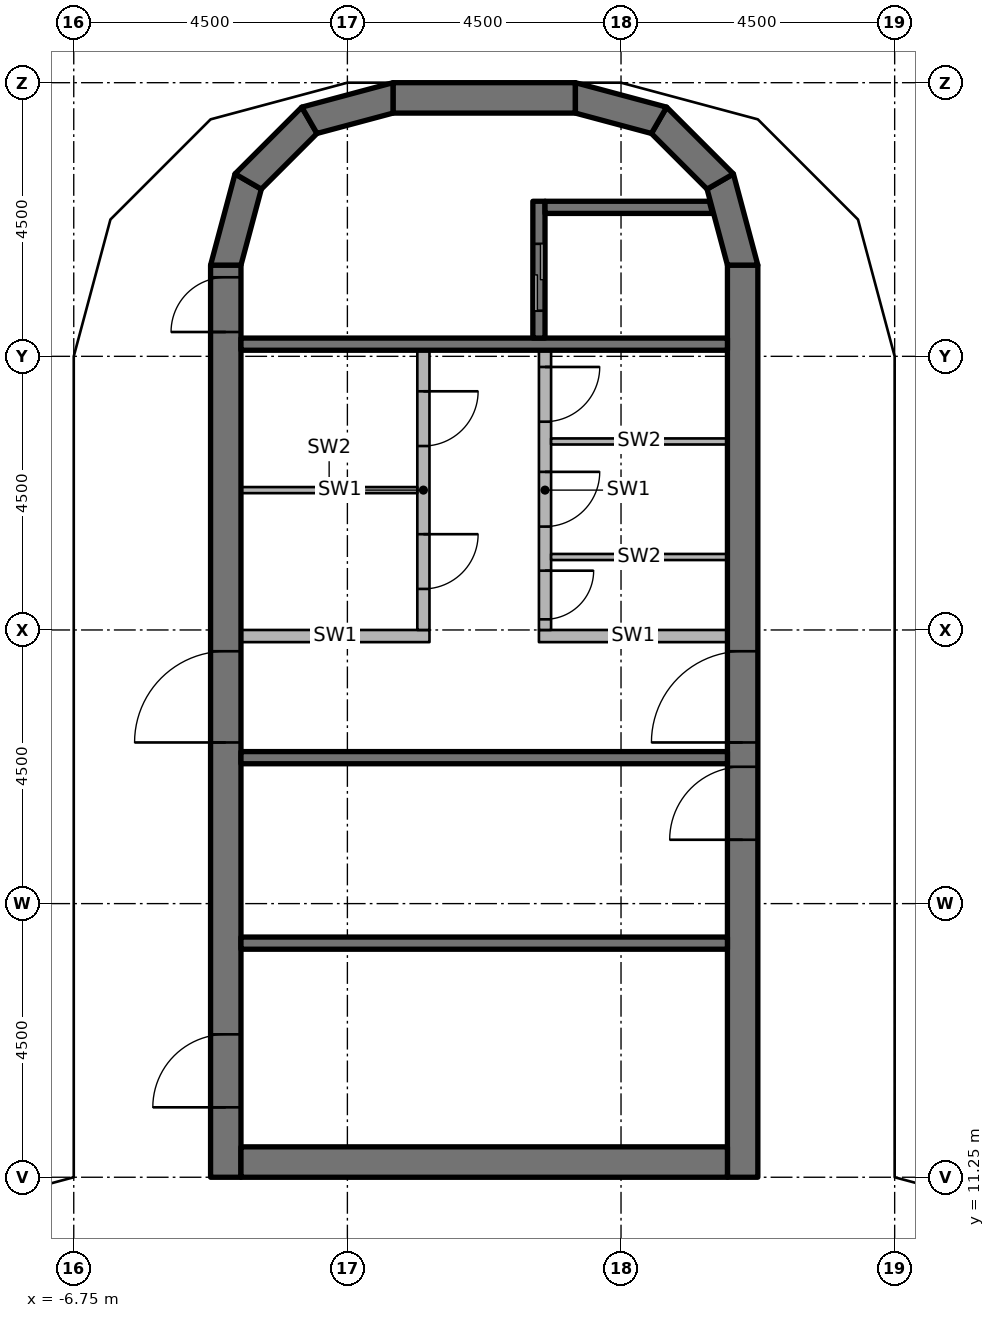
"""IFC4 building model, lengths in metres.
Left out: names, types, materials, properties, quantities, classifications, styles, units other than length and angle.
Written with IfcOpenShell. Run it as: python <this file> out.ifc"""

import sys

from ifc_helpers import new_model, si_unit, direction, frame, frame_2d, origin, origin_2d, place, context, subcontext, project, spatial, polyline, rectangle, outline, extrude, element, fill, save


model = new_model("IFC4")
c1 = context("Model", 3, precision=1e-05, world=origin(), true_north=direction((0.0, 1.0)))
c2 = subcontext(c1, "Body", "Model", "MODEL_VIEW")
j1 = project(units=[si_unit("LENGTHUNIT", "METRE"), si_unit("PLANEANGLEUNIT", "RADIAN")], contexts=[c1])
p1 = place(None, origin())
s1 = spatial("IfcSite", under=j1, at=p1, CompositionType="ELEMENT")
p2 = place(p1, origin())
s2 = spatial("IfcBuilding", under=s1, at=p2, CompositionType="ELEMENT")
p3 = place(p2, frame((0.0, 0.0, 284.0)))
s3 = spatial("IfcBuildingStorey", under=s2, at=p3, CompositionType="ELEMENT", Elevation=284.0)
for number, where, z_axis, x_axis in (
    (1, (-6.25, 10.75, 0.0), (0.0, 0.0, 1.0), (1.0, 0.0, 0.0)),
    (2, (-6.25, 15.75, 0.0), (0.0, 0.0, 1.0), (1.0, 0.0, 0.0)),
    (3, (-6.25, 20.25, 0.0), (0.0, 0.0, 1.0), (1.0, 0.0, 0.0)),
    (4, (-6.25, 24.65, 0.0), (0.0, 0.0, 1.0), (1.0, 0.0, 0.0)),
    (5, (6.25, 10.75, 0.0), (0.0, 0.0, 1.0), (1.0, 0.0, 0.0)),
    (6, (6.25, 15.75, 0.0), (0.0, 0.0, 1.0), (1.0, 0.0, 0.0)),
    (7, (6.25, 20.25, 0.0), (0.0, 0.0, 1.0), (1.0, 0.0, 0.0)),
    (8, (6.25, 24.65, 0.0), (0.0, 0.0, 1.0), (1.0, 0.0, 0.0)),
):
    element("IfcColumn", number, at=place(p3, frame(where, z_axis=z_axis, x_axis=x_axis)), inside=s3, PredefinedType="COLUMN", context=c2, shape_type="SweptSolid", body=[
        extrude(rectangle(XDim=0.6, YDim=0.6, at=origin_2d()), origin(), (0.0, 0.0, 1.0), 7.45),
    ])
p4 = place(p3, frame((-4.25, 11.25, 0.0), z_axis=(0.0, 0.0, 1.0), x_axis=(0.0, 1.0, 0.0)))
e9 = element("IfcWall", 9, at=p4, inside=s3, PredefinedType="SHEAR", context=c2, shape_type="SweptSolid", body=[
    extrude(rectangle(XDim=15.0, YDim=0.5, at=frame_2d((7.5, 0.0))), origin(), (0.0, 0.0, 1.0), 7.6),
])
p5 = place(p4, frame((7.15, 0.0, 0.0)))
e10 = element("IfcOpeningElement", 10, at=p5, cuts=e9, PredefinedType="OPENING", context=c2, shape_type="SweptSolid", body=[
    extrude(rectangle(XDim=1.5, YDim=2.3, at=frame_2d((0.75, 1.15))), frame((0.0, 0.26, 0.0), z_axis=(0.0, -1.0, 0.0), x_axis=(1.0, 0.0, 0.0)), (0.0, 0.0, 1.0), 0.52),
])
p6 = place(p4, frame((13.9, 0.0, 0.0)))
e11 = element("IfcOpeningElement", 11, at=p6, cuts=e9, PredefinedType="OPENING", context=c2, shape_type="SweptSolid", body=[
    extrude(rectangle(XDim=0.9, YDim=2.1, at=frame_2d((0.45, 1.05))), frame((0.0, 0.26, 0.0), z_axis=(0.0, -1.0, 0.0), x_axis=(1.0, 0.0, 0.0)), (0.0, 0.0, 1.0), 0.52),
])
p7 = place(p4, frame((1.15, 0.0, 0.0)))
e12 = element("IfcOpeningElement", 12, at=p7, cuts=e9, PredefinedType="OPENING", context=c2, shape_type="SweptSolid", body=[
    extrude(rectangle(XDim=1.2, YDim=2.1, at=frame_2d((0.6, 1.05))), frame((0.0, 0.26, 0.0), z_axis=(0.0, -1.0, 0.0), x_axis=(1.0, 0.0, 0.0)), (0.0, 0.0, 1.0), 0.52),
])
p8 = place(p3, frame((4.25, 11.25, 0.0), z_axis=(0.0, 0.0, 1.0), x_axis=(0.0, 1.0, 0.0)))
e13 = element("IfcWall", 13, at=p8, inside=s3, PredefinedType="SHEAR", context=c2, shape_type="SweptSolid", body=[
    extrude(rectangle(XDim=15.0, YDim=0.5, at=frame_2d((7.5, 0.0))), origin(), (0.0, 0.0, 1.0), 7.6),
])
p9 = place(p8, frame((7.15, 0.0, 0.0)))
e14 = element("IfcOpeningElement", 14, at=p9, cuts=e13, PredefinedType="OPENING", context=c2, shape_type="SweptSolid", body=[
    extrude(rectangle(XDim=1.5, YDim=2.3, at=frame_2d((0.75, 1.15))), frame((0.0, 0.26, 0.0), z_axis=(0.0, -1.0, 0.0), x_axis=(1.0, 0.0, 0.0)), (0.0, 0.0, 1.0), 0.52),
])
p10 = place(p8, frame((5.55, 0.0, 0.0)))
e15 = element("IfcOpeningElement", 15, at=p10, cuts=e13, PredefinedType="OPENING", context=c2, shape_type="SweptSolid", body=[
    extrude(rectangle(XDim=1.2, YDim=2.1, at=frame_2d((0.6, 1.05))), frame((0.0, 0.26, 0.0), z_axis=(0.0, -1.0, 0.0), x_axis=(1.0, 0.0, 0.0)), (0.0, 0.0, 1.0), 0.52),
])
p11 = place(p3, frame((-4.0, 11.5, 0.0), z_axis=(0.0, 0.0, 1.0), x_axis=(1.0, 0.0, 0.0)))
e16 = element("IfcWall", 16, at=p11, inside=s3, PredefinedType="SHEAR", context=c2, shape_type="SweptSolid", body=[
    extrude(rectangle(XDim=8.0, YDim=0.5, at=frame_2d((4.0, 0.0))), origin(), (0.0, 0.0, 1.0), 7.6),
])
p12 = place(p3, frame((-1.5, 29.0, 0.0), z_axis=(0.0, 0.0, 1.0), x_axis=(1.0, 0.0, 0.0)))
e17 = element("IfcWall", 17, at=p12, inside=s3, PredefinedType="SHEAR", context=c2, shape_type="SweptSolid", body=[
    extrude(rectangle(XDim=3.0, YDim=0.5, at=frame_2d((1.5, 0.0))), origin(), (0.0, 0.0, 1.0), 7.6),
])
p13 = place(p3, origin())
e18 = element("IfcWall", 18, at=p13, inside=s3, PredefinedType="SHEAR", context=c2, shape_type="SweptSolid", body=[
    extrude(outline(polyline([(-4.5, 26.25), (-4.098, 27.75), (-3.665, 27.5), (-4.0, 26.25), (-4.5, 26.25)])), origin(), (0.0, 0.0, 1.0), 7.6),
])
p14 = place(p3, origin())
e19 = element("IfcWall", 19, at=p14, inside=s3, PredefinedType="SHEAR", context=c2, shape_type="SweptSolid", body=[
    extrude(outline(polyline([(-4.098, 27.75), (-3.0, 28.848), (-2.75, 28.415), (-3.665, 27.5), (-4.098, 27.75)])), origin(), (0.0, 0.0, 1.0), 7.6),
])
p15 = place(p3, origin())
e20 = element("IfcWall", 20, at=p15, inside=s3, PredefinedType="SHEAR", context=c2, shape_type="SweptSolid", body=[
    extrude(outline(polyline([(-3.0, 28.848), (-1.5, 29.25), (-1.5, 28.75), (-2.75, 28.415), (-3.0, 28.848)])), origin(), (0.0, 0.0, 1.0), 7.6),
])
p16 = place(p3, origin())
e21 = element("IfcWall", 21, at=p16, inside=s3, PredefinedType="SHEAR", context=c2, shape_type="SweptSolid", body=[
    extrude(outline(polyline([(4.5, 26.25), (4.098, 27.75), (3.665, 27.5), (4.0, 26.25), (4.5, 26.25)])), origin(), (0.0, 0.0, 1.0), 7.6),
])
p17 = place(p3, origin())
e22 = element("IfcWall", 22, at=p17, inside=s3, PredefinedType="SHEAR", context=c2, shape_type="SweptSolid", body=[
    extrude(outline(polyline([(4.098, 27.75), (3.0, 28.848), (2.75, 28.415), (3.665, 27.5), (4.098, 27.75)])), origin(), (0.0, 0.0, 1.0), 7.6),
])
p18 = place(p3, origin())
e23 = element("IfcWall", 23, at=p18, inside=s3, PredefinedType="SHEAR", context=c2, shape_type="SweptSolid", body=[
    extrude(outline(polyline([(3.0, 28.848), (1.5, 29.25), (1.5, 28.75), (2.75, 28.415), (3.0, 28.848)])), origin(), (0.0, 0.0, 1.0), 7.6),
])
p19 = place(p3, frame((-4.0, 24.95, 0.0), z_axis=(0.0, 0.0, 1.0), x_axis=(1.0, 0.0, 0.0)))
e24 = element("IfcWall", 24, at=p19, inside=s3, PredefinedType="SHEAR", context=c2, shape_type="SweptSolid", body=[
    extrude(rectangle(XDim=8.0, YDim=0.2, at=frame_2d((4.0, 0.0))), origin(), (0.0, 0.0, 1.0), 7.45),
])
p20 = place(p3, frame((0.9, 27.3, 0.0), z_axis=(0.0, 0.0, 1.0), x_axis=(0.0, -1.0, 0.0)))
e25 = element("IfcWall", 25, at=p20, inside=s3, PredefinedType="SHEAR", context=c2, shape_type="SweptSolid", body=[
    extrude(rectangle(XDim=2.25, YDim=0.2, at=frame_2d((1.125, 0.0))), origin(), (0.0, 0.0, 1.0), 7.45),
])
p21 = place(p20, frame((0.7, 0.0, 0.0)))
e26 = element("IfcOpeningElement", 26, at=p21, cuts=e25, PredefinedType="OPENING", context=c2, shape_type="SweptSolid", body=[
    extrude(rectangle(XDim=1.1, YDim=2.3, at=frame_2d((0.55, 1.15))), frame((0.0, 0.11, 0.0), z_axis=(0.0, -1.0, 0.0), x_axis=(1.0, 0.0, 0.0)), (0.0, 0.0, 1.0), 0.22),
])
p22 = place(p3, origin())
e27 = element("IfcWall", 27, at=p22, inside=s3, PredefinedType="SHEAR", context=c2, shape_type="SweptSolid", body=[
    extrude(outline(polyline([(1.0, 27.1), (3.755, 27.1), (3.701, 27.3), (1.0, 27.3), (1.0, 27.1)])), origin(), (0.0, 0.0, 1.0), 7.45),
])
for number, where, z_axis, x_axis in (
    (28, (-4.0, 18.15, 0.0), (0.0, 0.0, 1.0), (1.0, 0.0, 0.0)),
    (29, (-4.0, 15.1, 0.0), (0.0, 0.0, 1.0), (1.0, 0.0, 0.0)),
):
    element("IfcWall", number, at=place(p3, frame(where, z_axis=z_axis, x_axis=x_axis)), inside=s3, PredefinedType="SHEAR", context=c2, shape_type="SweptSolid", body=[
        extrude(rectangle(XDim=8.0, YDim=0.2, at=frame_2d((4.0, 0.0))), origin(), (0.0, 0.0, 1.0), 7.45),
    ])
p23 = place(p3, frame((-4.0, 20.15, 0.0), z_axis=(0.0, 0.0, 1.0), x_axis=(1.0, 0.0, 0.0)))
e30 = element("IfcWall", 30, at=p23, inside=s3, PredefinedType="PARTITIONING", context=c2, shape_type="SweptSolid", body=[
    extrude(rectangle(XDim=3.1, YDim=0.2, at=frame_2d((1.55, 0.0))), origin(), (0.0, 0.0, 1.0), 7.45),
])
p24 = place(p3, frame((-1.0, 24.85, 0.0), z_axis=(0.0, 0.0, 1.0), x_axis=(0.0, -1.0, 0.0)))
e31 = element("IfcWall", 31, at=p24, inside=s3, PredefinedType="PARTITIONING", context=c2, shape_type="SweptSolid", body=[
    extrude(rectangle(XDim=4.6, YDim=0.2, at=frame_2d((2.3, 0.0))), origin(), (0.0, 0.0, 1.0), 7.45),
])
p25 = place(p24, frame((0.675, 0.0, 0.0)))
e32 = element("IfcOpeningElement", 32, at=p25, cuts=e31, PredefinedType="OPENING", context=c2, shape_type="SweptSolid", body=[
    extrude(rectangle(XDim=0.9, YDim=2.1, at=frame_2d((0.45, 1.05))), frame((0.0, 0.11, 0.0), z_axis=(0.0, -1.0, 0.0), x_axis=(1.0, 0.0, 0.0)), (0.0, 0.0, 1.0), 0.22),
])
p26 = place(p24, frame((3.025, 0.0, 0.0)))
e33 = element("IfcOpeningElement", 33, at=p26, cuts=e31, PredefinedType="OPENING", context=c2, shape_type="SweptSolid", body=[
    extrude(rectangle(XDim=0.9, YDim=2.1, at=frame_2d((0.45, 1.05))), frame((0.0, 0.11, 0.0), z_axis=(0.0, -1.0, 0.0), x_axis=(1.0, 0.0, 0.0)), (0.0, 0.0, 1.0), 0.22),
])
p27 = place(p3, frame((0.9, 20.15, 0.0), z_axis=(0.0, 0.0, 1.0), x_axis=(1.0, 0.0, 0.0)))
e34 = element("IfcWall", 34, at=p27, inside=s3, PredefinedType="PARTITIONING", context=c2, shape_type="SweptSolid", body=[
    extrude(rectangle(XDim=3.1, YDim=0.2, at=frame_2d((1.55, 0.0))), origin(), (0.0, 0.0, 1.0), 7.45),
])
p28 = place(p3, frame((1.0, 24.85, 0.0), z_axis=(0.0, 0.0, 1.0), x_axis=(0.0, -1.0, 0.0)))
e35 = element("IfcWall", 35, at=p28, inside=s3, PredefinedType="PARTITIONING", context=c2, shape_type="SweptSolid", body=[
    extrude(rectangle(XDim=4.6, YDim=0.2, at=frame_2d((2.3, 0.0))), origin(), (0.0, 0.0, 1.0), 7.45),
])
p29 = place(p28, frame((0.275, 0.0, 0.0)))
e36 = element("IfcOpeningElement", 36, at=p29, cuts=e35, PredefinedType="OPENING", context=c2, shape_type="SweptSolid", body=[
    extrude(rectangle(XDim=0.9, YDim=2.1, at=frame_2d((0.45, 1.05))), frame((0.0, 0.11, 0.0), z_axis=(0.0, -1.0, 0.0), x_axis=(1.0, 0.0, 0.0)), (0.0, 0.0, 1.0), 0.22),
])
p30 = place(p28, frame((2.0, 0.0, 0.0)))
e37 = element("IfcOpeningElement", 37, at=p30, cuts=e35, PredefinedType="OPENING", context=c2, shape_type="SweptSolid", body=[
    extrude(rectangle(XDim=0.9, YDim=2.1, at=frame_2d((0.45, 1.05))), frame((0.0, 0.11, 0.0), z_axis=(0.0, -1.0, 0.0), x_axis=(1.0, 0.0, 0.0)), (0.0, 0.0, 1.0), 0.22),
])
p31 = place(p28, frame((3.625, 0.0, 0.0)))
e38 = element("IfcOpeningElement", 38, at=p31, cuts=e35, PredefinedType="OPENING", context=c2, shape_type="SweptSolid", body=[
    extrude(rectangle(XDim=0.8, YDim=2.1, at=frame_2d((0.4, 1.05))), frame((0.0, 0.11, 0.0), z_axis=(0.0, -1.0, 0.0), x_axis=(1.0, 0.0, 0.0)), (0.0, 0.0, 1.0), 0.22),
])
for number, where, z_axis, x_axis in (
    (39, (-4.0, 22.55, 0.0), (0.0, 0.0, 1.0), (1.0, 0.0, 0.0)),
    (40, (1.1, 23.35, 0.0), (0.0, 0.0, 1.0), (1.0, 0.0, 0.0)),
    (41, (1.1, 21.45, 0.0), (0.0, 0.0, 1.0), (1.0, 0.0, 0.0)),
):
    element("IfcWall", number, at=place(p3, frame(where, z_axis=z_axis, x_axis=x_axis)), inside=s3, PredefinedType="PARTITIONING", context=c2, shape_type="SweptSolid", body=[
        extrude(rectangle(XDim=2.9, YDim=0.1, at=frame_2d((1.45, 0.0))), origin(), (0.0, 0.0, 1.0), 7.45),
    ])
p32 = place(p5, origin())
e42 = element("IfcDoor", 42, at=p32, inside=s3, OperationType="DOUBLE_DOOR_SINGLE_SWING", PredefinedType="DOOR", context=c2, shape_type="SweptSolid", body=[
    extrude(rectangle(XDim=1.5, YDim=2.3, at=frame_2d((0.75, 1.15))), frame((0.0, 0.025, 0.0), z_axis=(0.0, -1.0, 0.0), x_axis=(1.0, 0.0, 0.0)), (0.0, 0.0, 1.0), 0.05),
])
fill(e10, e42)
p33 = place(p9, origin())
e43 = element("IfcDoor", 43, at=p33, inside=s3, OperationType="DOUBLE_DOOR_SINGLE_SWING", PredefinedType="DOOR", context=c2, shape_type="SweptSolid", body=[
    extrude(rectangle(XDim=1.5, YDim=2.3, at=frame_2d((0.75, 1.15))), frame((0.0, 0.025, 0.0), z_axis=(0.0, -1.0, 0.0), x_axis=(1.0, 0.0, 0.0)), (0.0, 0.0, 1.0), 0.05),
])
fill(e14, e43)
p34 = place(p6, origin())
e44 = element("IfcDoor", 44, at=p34, inside=s3, OperationType="SINGLE_SWING_RIGHT", PredefinedType="DOOR", context=c2, shape_type="SweptSolid", body=[
    extrude(rectangle(XDim=0.9, YDim=2.1, at=frame_2d((0.45, 1.05))), frame((0.0, 0.025, 0.0), z_axis=(0.0, -1.0, 0.0), x_axis=(1.0, 0.0, 0.0)), (0.0, 0.0, 1.0), 0.05),
])
fill(e11, e44)
p35 = place(p10, origin())
e45 = element("IfcDoor", 45, at=p35, inside=s3, OperationType="SINGLE_SWING_LEFT", PredefinedType="DOOR", context=c2, shape_type="SweptSolid", body=[
    extrude(rectangle(XDim=1.2, YDim=2.1, at=frame_2d((0.6, 1.05))), frame((0.0, 0.025, 0.0), z_axis=(0.0, -1.0, 0.0), x_axis=(1.0, 0.0, 0.0)), (0.0, 0.0, 1.0), 0.05),
])
fill(e15, e45)
p36 = place(p7, origin())
e46 = element("IfcDoor", 46, at=p36, inside=s3, OperationType="SINGLE_SWING_LEFT", PredefinedType="DOOR", context=c2, shape_type="SweptSolid", body=[
    extrude(rectangle(XDim=1.2, YDim=2.1, at=frame_2d((0.6, 1.05))), frame((0.0, 0.025, 0.0), z_axis=(0.0, -1.0, 0.0), x_axis=(1.0, 0.0, 0.0)), (0.0, 0.0, 1.0), 0.05),
])
fill(e12, e46)
p37 = place(p21, origin())
e47 = element("IfcDoor", 47, at=p37, inside=s3, OperationType="DOUBLE_DOOR_SLIDING", PredefinedType="DOOR", context=c2, shape_type="SweptSolid", body=[
    extrude(rectangle(XDim=1.1, YDim=2.3, at=frame_2d((0.55, 1.15))), frame((0.0, 0.025, 0.0), z_axis=(0.0, -1.0, 0.0), x_axis=(1.0, 0.0, 0.0)), (0.0, 0.0, 1.0), 0.05),
])
fill(e26, e47)
p38 = place(p25, origin())
e48 = element("IfcDoor", 48, at=p38, inside=s3, OperationType="SINGLE_SWING_LEFT", PredefinedType="DOOR", context=c2, shape_type="SweptSolid", body=[
    extrude(rectangle(XDim=0.9, YDim=2.1, at=frame_2d((0.45, 1.05))), frame((0.0, 0.025, 0.0), z_axis=(0.0, -1.0, 0.0), x_axis=(1.0, 0.0, 0.0)), (0.0, 0.0, 1.0), 0.05),
])
fill(e32, e48)
p39 = place(p26, origin())
e49 = element("IfcDoor", 49, at=p39, inside=s3, OperationType="SINGLE_SWING_RIGHT", PredefinedType="DOOR", context=c2, shape_type="SweptSolid", body=[
    extrude(rectangle(XDim=0.9, YDim=2.1, at=frame_2d((0.45, 1.05))), frame((0.0, 0.025, 0.0), z_axis=(0.0, -1.0, 0.0), x_axis=(1.0, 0.0, 0.0)), (0.0, 0.0, 1.0), 0.05),
])
fill(e33, e49)
p40 = place(p29, origin())
e50 = element("IfcDoor", 50, at=p40, inside=s3, OperationType="SINGLE_SWING_LEFT", PredefinedType="DOOR", context=c2, shape_type="SweptSolid", body=[
    extrude(rectangle(XDim=0.9, YDim=2.1, at=frame_2d((0.45, 1.05))), frame((0.0, 0.025, 0.0), z_axis=(0.0, -1.0, 0.0), x_axis=(1.0, 0.0, 0.0)), (0.0, 0.0, 1.0), 0.05),
])
fill(e36, e50)
p41 = place(p30, origin())
e51 = element("IfcDoor", 51, at=p41, inside=s3, OperationType="SINGLE_SWING_RIGHT", PredefinedType="DOOR", context=c2, shape_type="SweptSolid", body=[
    extrude(rectangle(XDim=0.9, YDim=2.1, at=frame_2d((0.45, 1.05))), frame((0.0, 0.025, 0.0), z_axis=(0.0, -1.0, 0.0), x_axis=(1.0, 0.0, 0.0)), (0.0, 0.0, 1.0), 0.05),
])
fill(e37, e51)
p42 = place(p31, origin())
e52 = element("IfcDoor", 52, at=p42, inside=s3, OperationType="SINGLE_SWING_LEFT", PredefinedType="DOOR", context=c2, shape_type="SweptSolid", body=[
    extrude(rectangle(XDim=0.8, YDim=2.1, at=frame_2d((0.4, 1.05))), frame((0.0, 0.025, 0.0), z_axis=(0.0, -1.0, 0.0), x_axis=(1.0, 0.0, 0.0)), (0.0, 0.0, 1.0), 0.05),
])
fill(e38, e52)
save(model, sys.argv[1])
